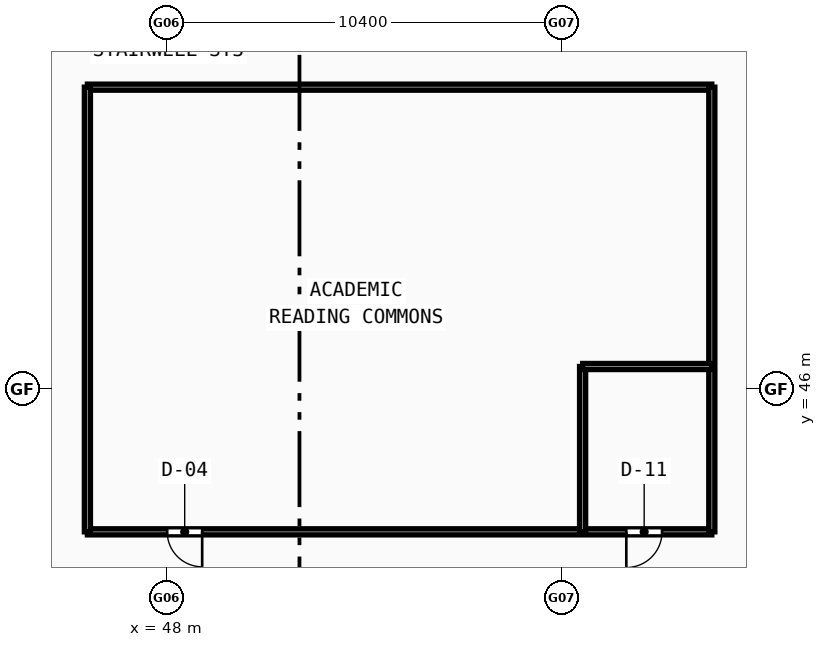
"""IFC4 building model, lengths in metres.
Left out: names, types, materials, properties, quantities, classifications, styles, units other than length and angle.
Written with IfcOpenShell. Run it as: python <this file> out.ifc"""

import sys

from ifc_helpers import new_model, si_unit, direction, frame, frame_2d, origin, place, context, subcontext, project, spatial, rectangle, extrude, source, transform, mapped, element, fill, save


model = new_model("IFC4")
c1 = context("Model", 3, precision=1e-05, world=origin(), true_north=direction((0.0, 1.0)))
c2 = subcontext(c1, "Body", "Model", "MODEL_VIEW")
j1 = project(units=[si_unit("LENGTHUNIT", "METRE"), si_unit("PLANEANGLEUNIT", "RADIAN")], contexts=[c1])
p1 = place(None, origin())
s1 = spatial("IfcSite", under=j1, at=p1, CompositionType="ELEMENT")
p2 = place(p1, origin())
s2 = spatial("IfcBuilding", under=s1, at=p2, CompositionType="ELEMENT")
p3 = place(p2, frame((0.0, 0.0, 41.29)))
s3 = spatial("IfcBuildingStorey", under=s2, at=p3, CompositionType="ELEMENT", Elevation=41.29)
p4 = place(p3, frame((45.92, 42.25, 0.0), z_axis=(0.0, 0.0, 1.0), x_axis=(1.0, 0.0, 0.0)))
e1 = element("IfcWall", 1, at=p4, inside=s3, PredefinedType="PARTITIONING", context=c2, shape_type="SweptSolid", body=[
    extrude(rectangle(XDim=16.43, YDim=0.16, at=frame_2d((8.215, 0.0))), origin(), (0.0, 0.0, 1.0), 2.67),
])
p5 = place(p4, frame((2.1, 0.0, 0.0)))
e2 = element("IfcOpeningElement", 2, at=p5, cuts=e1, PredefinedType="OPENING", context=c2, shape_type="SweptSolid", body=[
    extrude(rectangle(XDim=0.92, YDim=2.1, at=frame_2d((0.46, 1.05))), frame((0.0, 0.09, 0.0), z_axis=(0.0, -1.0, 0.0), x_axis=(1.0, 0.0, 0.0)), (0.0, 0.0, 1.0), 0.18),
])
p6 = place(p4, frame((14.18, 0.0, 0.0)))
e3 = element("IfcOpeningElement", 3, at=p6, cuts=e1, PredefinedType="OPENING", context=c2, shape_type="SweptSolid", body=[
    extrude(rectangle(XDim=0.94, YDim=2.1, at=frame_2d((0.47, 1.05))), frame((0.0, 0.09, 0.0), z_axis=(0.0, -1.0, 0.0), x_axis=(1.0, 0.0, 0.0)), (0.0, 0.0, 1.0), 0.18),
])
p7 = place(p3, frame((45.92, 53.95, 0.0), z_axis=(0.0, 0.0, 1.0), x_axis=(1.0, 0.0, 0.0)))
e4 = element("IfcWall", 4, at=p7, inside=s3, PredefinedType="PARTITIONING", context=c2, shape_type="SweptSolid", body=[
    extrude(rectangle(XDim=16.43, YDim=0.16, at=frame_2d((8.215, 0.0))), origin(), (0.0, 0.0, 1.0), 2.67),
])
p8 = place(p3, frame((45.92, 42.25, 0.0), z_axis=(0.0, 0.0, 1.0), x_axis=(0.0, 1.0, 0.0)))
e5 = element("IfcWall", 5, at=p8, inside=s3, PredefinedType="PARTITIONING", context=c2, shape_type="SweptSolid", body=[
    extrude(rectangle(XDim=11.7, YDim=0.16, at=frame_2d((5.85, 0.0))), origin(), (0.0, 0.0, 1.0), 2.97),
])
p9 = place(p3, frame((62.35, 42.25, 0.0), z_axis=(0.0, 0.0, 1.0), x_axis=(0.0, 1.0, 0.0)))
e6 = element("IfcWall", 6, at=p9, inside=s3, PredefinedType="PARTITIONING", context=c2, shape_type="SweptSolid", body=[
    extrude(rectangle(XDim=11.7, YDim=0.16, at=frame_2d((5.85, 0.0))), origin(), (0.0, 0.0, 1.0), 2.67),
])
p10 = place(p3, frame((58.95, 42.25, 0.0), z_axis=(0.0, 0.0, 1.0), x_axis=(0.0, 1.0, 0.0)))
e7 = element("IfcWall", 7, at=p10, inside=s3, PredefinedType="PARTITIONING", context=c2, shape_type="SweptSolid", body=[
    extrude(rectangle(XDim=4.35, YDim=0.16, at=frame_2d((2.175, 0.0))), origin(), (0.0, 0.0, 1.0), 2.67),
])
p11 = place(p3, frame((58.95, 46.6, 0.0), z_axis=(0.0, 0.0, 1.0), x_axis=(1.0, 0.0, 0.0)))
e8 = element("IfcWall", 8, at=p11, inside=s3, PredefinedType="PARTITIONING", context=c2, shape_type="SweptSolid", body=[
    extrude(rectangle(XDim=3.4, YDim=0.16, at=frame_2d((1.7, 0.0))), origin(), (0.0, 0.0, 1.0), 2.67),
])
m1 = source(origin(), c2, "Body", "SweptSolid", [
    extrude(rectangle(XDim=0.92, YDim=2.1, at=frame_2d((0.46, 1.05))), frame((0.0, 0.025, 0.0), z_axis=(0.0, -1.0, 0.0), x_axis=(1.0, 0.0, 0.0)), (0.0, 0.0, 1.0), 0.05),
])
p12 = place(p5, frame((0.92, 0.0, 0.0), z_axis=(0.0, 0.0, 1.0), x_axis=(-1.0, 0.0, 0.0)))
e9 = element("IfcDoor", 9, at=p12, inside=s3, OperationType="SINGLE_SWING_LEFT", PredefinedType="DOOR", context=c2, shape_type="MappedRepresentation", body=[
    mapped(m1, transform((0.0, 0.0, 0.0), scale=1.0)),
])
fill(e2, e9)
m2 = source(origin(), c2, "Body", "SweptSolid", [
    extrude(rectangle(XDim=0.94, YDim=2.1, at=frame_2d((0.47, 1.05))), frame((0.0, 0.025, 0.0), z_axis=(0.0, -1.0, 0.0), x_axis=(1.0, 0.0, 0.0)), (0.0, 0.0, 1.0), 0.05),
])
p13 = place(p6, frame((0.94, 0.0, 0.0), z_axis=(0.0, 0.0, 1.0), x_axis=(-1.0, 0.0, 0.0)))
e10 = element("IfcDoor", 10, at=p13, inside=s3, OperationType="SINGLE_SWING_RIGHT", PredefinedType="DOOR", context=c2, shape_type="MappedRepresentation", body=[
    mapped(m2, transform((0.0, 0.0, 0.0), scale=1.0)),
])
fill(e3, e10)
save(model, sys.argv[1])
